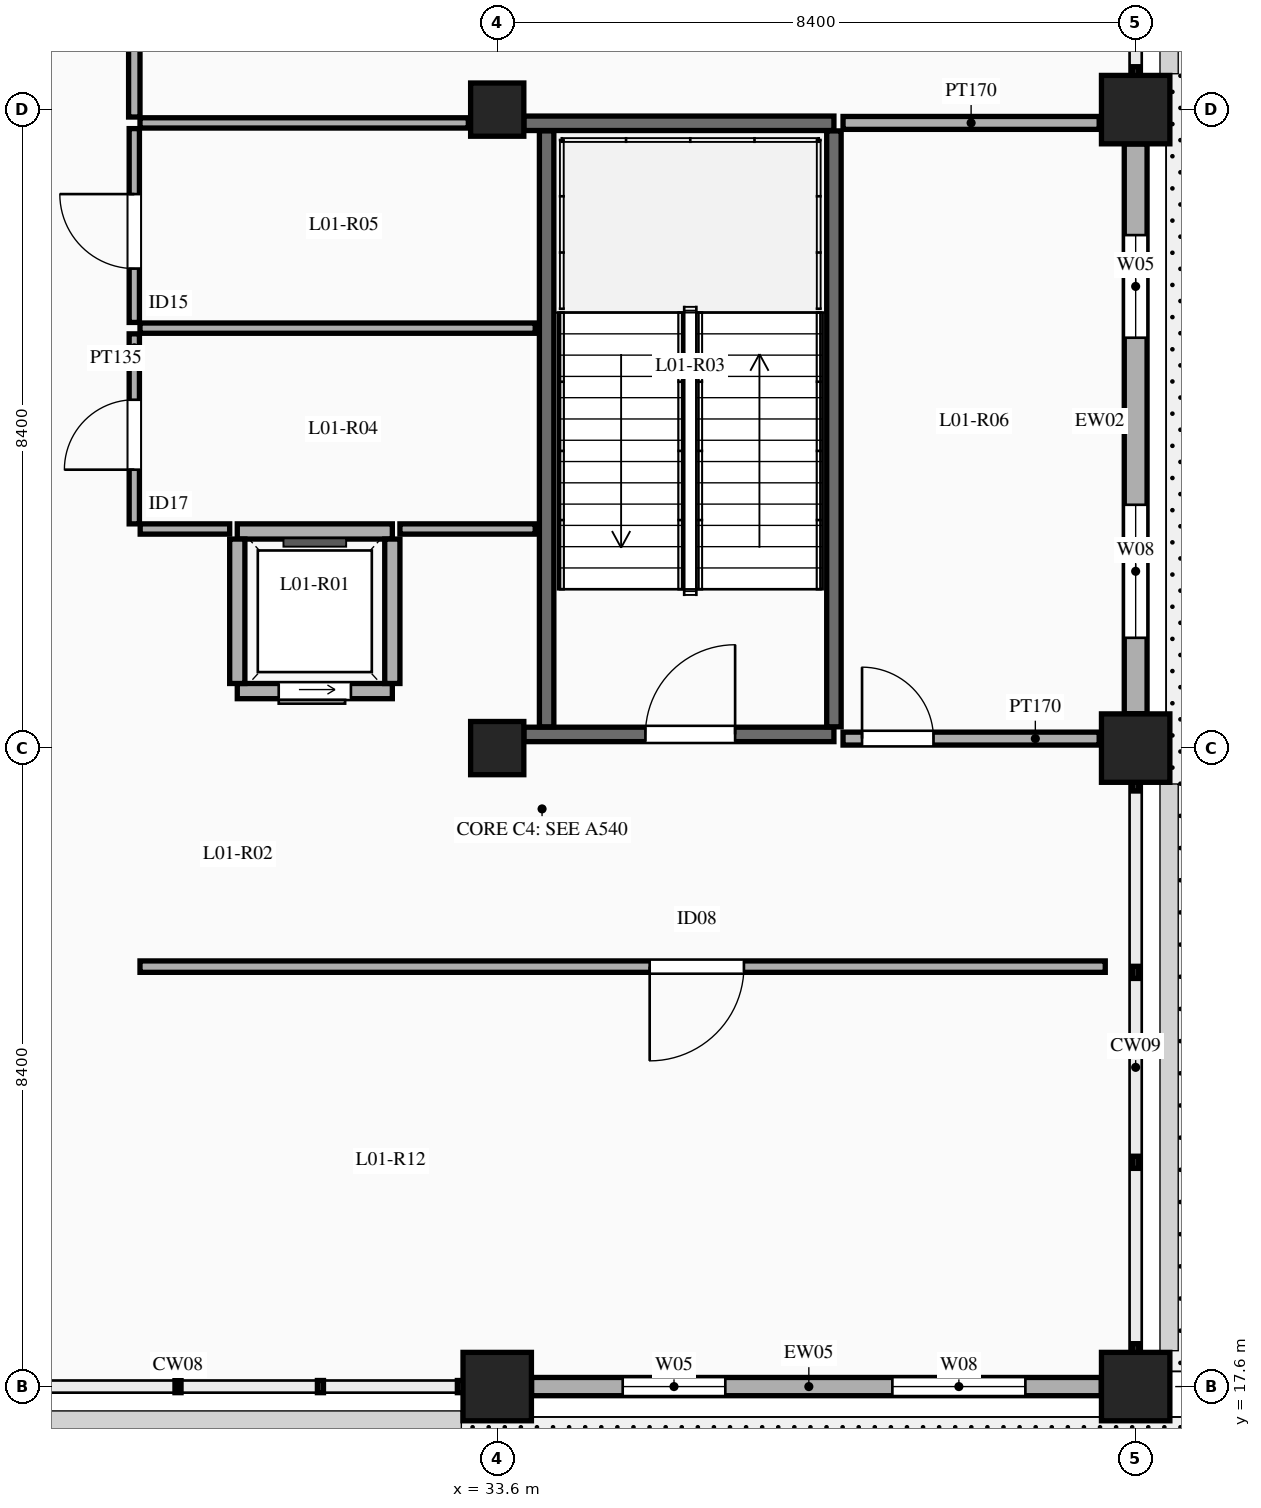
"""IFC4 building model, lengths in metres.
Left out: names, types, materials, properties, quantities, classifications, styles, units other than length and angle.
Written with IfcOpenShell. Run it as: python <this file> out.ifc"""

import sys

from ifc_helpers import new_model, si_unit, direction, frame, frame_2d, origin, origin_2d, place, context, subcontext, project, spatial, rectangle, circle, extrude, element, fill, save


model = new_model("IFC4")
c1 = context("Model", 3, precision=1e-05, world=origin(), true_north=direction((0.0, 1.0)))
c2 = subcontext(c1, "Body", "Model", "MODEL_VIEW")
j1 = project(units=[si_unit("LENGTHUNIT", "METRE"), si_unit("PLANEANGLEUNIT", "RADIAN")], contexts=[c1])
p1 = place(None, origin())
s1 = spatial("IfcSite", under=j1, at=p1, CompositionType="ELEMENT")
p2 = place(p1, origin())
s2 = spatial("IfcBuilding", under=s1, at=p2, CompositionType="ELEMENT")
p3 = place(p2, frame((0.0, 0.0, 5.4)))
s3 = spatial("IfcBuildingStorey", under=s2, at=p3, CompositionType="ELEMENT", Elevation=5.4)
p4 = place(p3, frame((33.6, 17.6, 0.0), z_axis=(0.0, 0.0, 1.0), x_axis=(1.0, 0.0, 0.0)))
e1 = element("IfcColumn", 1, at=p4, inside=s3, PredefinedType="COLUMN", context=c2, shape_type="SweptSolid", body=[
    extrude(circle(Radius=0.45, at=origin_2d()), origin(), (0.0, 0.0, 1.0), 4.8),
])
for number, where, z_axis, x_axis in (
    (2, (33.6, 26.0, 0.0), (0.0, 0.0, 1.0), (1.0, 0.0, 0.0)),
    (3, (33.6, 34.4, 0.0), (0.0, 0.0, 1.0), (1.0, 0.0, 0.0)),
):
    element("IfcColumn", number, at=place(p3, frame(where, z_axis=z_axis, x_axis=x_axis)), inside=s3, PredefinedType="COLUMN", context=c2, shape_type="SweptSolid", body=[
        extrude(rectangle(XDim=0.7, YDim=0.7, at=origin_2d()), origin(), (0.0, 0.0, 1.0), 4.8),
    ])
for number, where, z_axis, x_axis in (
    (4, (42.0, 17.6, 0.0), (0.0, 0.0, 1.0), (1.0, 0.0, 0.0)),
    (5, (42.0, 26.0, 0.0), (0.0, 0.0, 1.0), (1.0, 0.0, 0.0)),
    (6, (42.0, 34.4, 0.0), (0.0, 0.0, 1.0), (1.0, 0.0, 0.0)),
):
    element("IfcColumn", number, at=place(p3, frame(where, z_axis=z_axis, x_axis=x_axis)), inside=s3, PredefinedType="COLUMN", context=c2, shape_type="SweptSolid", body=[
        extrude(circle(Radius=0.45, at=origin_2d()), origin(), (0.0, 0.0, 1.0), 4.8),
    ])
p5 = place(p3, frame((34.052, 17.6, 0.0), z_axis=(0.0, 0.0, 1.0), x_axis=(1.0, 0.0, 0.0)))
e7 = element("IfcWall", 7, at=p5, inside=s3, PredefinedType="SOLIDWALL", context=c2, shape_type="SweptSolid", body=[
    extrude(rectangle(XDim=7.496, YDim=0.24, at=frame_2d((3.748, 0.0))), origin(), (0.0, 0.0, 1.0), 3.85),
])
p6 = place(p5, frame((1.199, 0.0, 0.9)))
e8 = element("IfcOpeningElement", 8, at=p6, cuts=e7, PredefinedType="OPENING", context=c2, shape_type="SweptSolid", body=[
    extrude(rectangle(XDim=1.35, YDim=1.85, at=frame_2d((0.675, 0.925))), frame((0.0, 0.13, 0.0), z_axis=(0.0, -1.0, 0.0), x_axis=(1.0, 0.0, 0.0)), (0.0, 0.0, 1.0), 0.26),
])
p7 = place(p5, frame((4.747, 0.0, 0.9)))
e9 = element("IfcOpeningElement", 9, at=p7, cuts=e7, PredefinedType="OPENING", context=c2, shape_type="SweptSolid", body=[
    extrude(rectangle(XDim=1.75, YDim=2.2, at=frame_2d((0.875, 1.1))), frame((0.0, 0.13, 0.0), z_axis=(0.0, -1.0, 0.0), x_axis=(1.0, 0.0, 0.0)), (0.0, 0.0, 1.0), 0.26),
])
p8 = place(p3, frame((42.0, 26.452, 0.0), z_axis=(0.0, 0.0, 1.0), x_axis=(0.0, 1.0, 0.0)))
e10 = element("IfcWall", 10, at=p8, inside=s3, PredefinedType="SOLIDWALL", context=c2, shape_type="SweptSolid", body=[
    extrude(rectangle(XDim=7.496, YDim=0.3, at=frame_2d((3.748, 0.0))), origin(), (0.0, 0.0, 1.0), 3.85),
])
p9 = place(p8, frame((0.999, 0.0, 0.9)))
e11 = element("IfcOpeningElement", 11, at=p9, cuts=e10, PredefinedType="OPENING", context=c2, shape_type="SweptSolid", body=[
    extrude(rectangle(XDim=1.75, YDim=2.2, at=frame_2d((0.875, 1.1))), frame((0.0, 0.16, 0.0), z_axis=(0.0, -1.0, 0.0), x_axis=(1.0, 0.0, 0.0)), (0.0, 0.0, 1.0), 0.32),
])
p10 = place(p8, frame((4.947, 0.0, 0.9)))
e12 = element("IfcOpeningElement", 12, at=p10, cuts=e10, PredefinedType="OPENING", context=c2, shape_type="SweptSolid", body=[
    extrude(rectangle(XDim=1.35, YDim=1.85, at=frame_2d((0.675, 0.925))), frame((0.0, 0.16, 0.0), z_axis=(0.0, -1.0, 0.0), x_axis=(1.0, 0.0, 0.0)), (0.0, 0.0, 1.0), 0.32),
])
p11 = place(p3, frame((30.18, 26.75, 0.0), z_axis=(0.0, 0.0, 1.0), x_axis=(1.0, 0.0, 0.0)))
e13 = element("IfcWall", 13, at=p11, inside=s3, PredefinedType="SOLIDWALL", context=c2, shape_type="SweptSolid", body=[
    extrude(rectangle(XDim=2.04, YDim=0.2, at=frame_2d((1.02, 0.0))), origin(), (0.0, 0.0, 1.0), 4.58),
])
p12 = place(p11, frame((0.545, 0.0, 0.0)))
e14 = element("IfcOpeningElement", 14, at=p12, cuts=e13, PredefinedType="OPENING", context=c2, shape_type="SweptSolid", body=[
    extrude(rectangle(XDim=0.95, YDim=2.15, at=frame_2d((0.475, 1.075))), frame((0.0, 0.11, 0.0), z_axis=(0.0, -1.0, 0.0), x_axis=(1.0, 0.0, 0.0)), (0.0, 0.0, 1.0), 0.22),
])
p13 = place(p3, frame((30.18, 28.85, 0.0), z_axis=(0.0, 0.0, 1.0), x_axis=(1.0, 0.0, 0.0)))
e15 = element("IfcWall", 15, at=p13, inside=s3, PredefinedType="SOLIDWALL", context=c2, shape_type="SweptSolid", body=[
    extrude(rectangle(XDim=2.04, YDim=0.2, at=frame_2d((1.02, 0.0))), origin(), (0.0, 0.0, 1.0), 4.58),
])
for number, where, z_axis, x_axis in (
    (16, (30.18, 26.85, 0.0), (0.0, 0.0, 1.0), (0.0, 1.0, 0.0)),
    (17, (32.22, 26.85, 0.0), (0.0, 0.0, 1.0), (0.0, 1.0, 0.0)),
):
    element("IfcWall", number, at=place(p3, frame(where, z_axis=z_axis, x_axis=x_axis)), inside=s3, PredefinedType="SOLIDWALL", context=c2, shape_type="SweptSolid", body=[
        extrude(rectangle(XDim=1.9, YDim=0.2, at=frame_2d((0.95, 0.0))), origin(), (0.0, 0.0, 1.0), 4.58),
    ])
p14 = place(p3, frame((33.95, 26.18, 0.0), z_axis=(0.0, 0.0, 1.0), x_axis=(1.0, 0.0, 0.0)))
e18 = element("IfcWall", 18, at=p14, inside=s3, PredefinedType="SOLIDWALL", context=c2, shape_type="SweptSolid", body=[
    extrude(rectangle(XDim=4.08, YDim=0.19, at=frame_2d((2.04, 0.0))), origin(), (0.0, 0.0, 1.0), 4.58),
])
p15 = place(p14, frame((1.6, 0.0, 0.0)))
e19 = element("IfcOpeningElement", 19, at=p15, cuts=e18, PredefinedType="OPENING", context=c2, shape_type="SweptSolid", body=[
    extrude(rectangle(XDim=1.18, YDim=2.15, at=frame_2d((0.59, 1.075))), frame((0.0, 0.105, 0.0), z_axis=(0.0, -1.0, 0.0), x_axis=(1.0, 0.0, 0.0)), (0.0, 0.0, 1.0), 0.21),
])
p16 = place(p3, frame((33.95, 34.22, 0.0), z_axis=(0.0, 0.0, 1.0), x_axis=(1.0, 0.0, 0.0)))
e20 = element("IfcWall", 20, at=p16, inside=s3, PredefinedType="SOLIDWALL", context=c2, shape_type="SweptSolid", body=[
    extrude(rectangle(XDim=4.08, YDim=0.19, at=frame_2d((2.04, 0.0))), origin(), (0.0, 0.0, 1.0), 4.58),
])
for number, where, z_axis, x_axis in (
    (21, (34.25, 26.28, 0.0), (0.0, 0.0, 1.0), (0.0, 1.0, 0.0)),
    (22, (38.03, 26.28, 0.0), (0.0, 0.0, 1.0), (0.0, 1.0, 0.0)),
):
    element("IfcWall", number, at=place(p3, frame(where, z_axis=z_axis, x_axis=x_axis)), inside=s3, PredefinedType="SOLIDWALL", context=c2, shape_type="SweptSolid", body=[
        extrude(rectangle(XDim=7.84, YDim=0.19, at=frame_2d((3.92, 0.0))), origin(), (0.0, 0.0, 1.0), 4.58),
    ])
p17 = place(p3, frame((38.15, 26.125, 0.0), z_axis=(0.0, 0.0, 1.0), x_axis=(1.0, 0.0, 0.0)))
e23 = element("IfcWall", 23, at=p17, inside=s3, PredefinedType="PARTITIONING", context=c2, shape_type="SweptSolid", body=[
    extrude(rectangle(XDim=3.37, YDim=0.17, at=frame_2d((1.685, 0.0))), origin(), (0.0, 0.0, 1.0), 2.95),
])
p18 = place(p17, frame((0.25, 0.0, 0.0)))
e24 = element("IfcOpeningElement", 24, at=p18, cuts=e23, PredefinedType="OPENING", context=c2, shape_type="SweptSolid", body=[
    extrude(rectangle(XDim=0.94, YDim=2.1, at=frame_2d((0.47, 1.05))), frame((0.0, 0.095, 0.0), z_axis=(0.0, -1.0, 0.0), x_axis=(1.0, 0.0, 0.0)), (0.0, 0.0, 1.0), 0.19),
])
p19 = place(p3, frame((28.9, 23.125, 0.0), z_axis=(0.0, 0.0, 1.0), x_axis=(1.0, 0.0, 0.0)))
e25 = element("IfcWall", 25, at=p19, inside=s3, PredefinedType="PARTITIONING", context=c2, shape_type="SweptSolid", body=[
    extrude(rectangle(XDim=12.7, YDim=0.15, at=frame_2d((6.35, 0.0))), origin(), (0.0, 0.0, 1.0), 2.95),
])
p20 = place(p19, frame((6.706, 0.0, 0.0)))
e26 = element("IfcOpeningElement", 26, at=p20, cuts=e25, PredefinedType="OPENING", context=c2, shape_type="SweptSolid", body=[
    extrude(rectangle(XDim=1.24, YDim=2.2, at=frame_2d((0.62, 1.1))), frame((0.0, 0.085, 0.0), z_axis=(0.0, -1.0, 0.0), x_axis=(1.0, 0.0, 0.0)), (0.0, 0.0, 1.0), 0.17),
])
p21 = place(p3, frame((28.9, 31.525, 0.0), z_axis=(0.0, 0.0, 1.0), x_axis=(1.0, 0.0, 0.0)))
e27 = element("IfcWall", 27, at=p21, inside=s3, PredefinedType="PARTITIONING", context=c2, shape_type="SweptSolid", body=[
    extrude(rectangle(XDim=5.2, YDim=0.135, at=frame_2d((2.6, 0.0))), origin(), (0.0, 0.0, 1.0), 2.95),
])
p22 = place(p3, frame((28.825, 28.95, 0.0), z_axis=(0.0, 0.0, 1.0), x_axis=(0.0, 1.0, 0.0)))
e28 = element("IfcWall", 28, at=p22, inside=s3, PredefinedType="PARTITIONING", context=c2, shape_type="SweptSolid", body=[
    extrude(rectangle(XDim=2.5, YDim=0.135, at=frame_2d((1.25, 0.0))), origin(), (0.0, 0.0, 1.0), 2.95),
])
p23 = place(p22, frame((0.713, 0.0, 0.0)))
e29 = element("IfcOpeningElement", 29, at=p23, cuts=e28, PredefinedType="OPENING", context=c2, shape_type="SweptSolid", body=[
    extrude(rectangle(XDim=0.92, YDim=2.12, at=frame_2d((0.46, 1.06))), frame((0.0, 0.077, 0.0), z_axis=(0.0, -1.0, 0.0), x_axis=(1.0, 0.0, 0.0)), (0.0, 0.0, 1.0), 0.155),
])
p24 = place(p3, frame((28.825, 31.6, 0.0), z_axis=(0.0, 0.0, 1.0), x_axis=(0.0, 1.0, 0.0)))
e30 = element("IfcWall", 30, at=p24, inside=s3, PredefinedType="PARTITIONING", context=c2, shape_type="SweptSolid", body=[
    extrude(rectangle(XDim=2.55, YDim=0.135, at=frame_2d((1.275, 0.0))), origin(), (0.0, 0.0, 1.0), 2.95),
])
p25 = place(p24, frame((0.708, 0.0, 0.0)))
e31 = element("IfcOpeningElement", 31, at=p25, cuts=e30, PredefinedType="OPENING", context=c2, shape_type="SweptSolid", body=[
    extrude(rectangle(XDim=0.98, YDim=2.15, at=frame_2d((0.49, 1.075))), frame((0.0, 0.077, 0.0), z_axis=(0.0, -1.0, 0.0), x_axis=(1.0, 0.0, 0.0)), (0.0, 0.0, 1.0), 0.155),
])
p26 = place(p3, frame((28.9, 34.225, 0.0), z_axis=(0.0, 0.0, 1.0), x_axis=(1.0, 0.0, 0.0)))
e32 = element("IfcWall", 32, at=p26, inside=s3, PredefinedType="PARTITIONING", context=c2, shape_type="SweptSolid", body=[
    extrude(rectangle(XDim=4.32, YDim=0.135, at=frame_2d((2.16, 0.0))), origin(), (0.0, 0.0, 1.0), 2.95),
])
p27 = place(p3, frame((38.15, 34.225, 0.0), z_axis=(0.0, 0.0, 1.0), x_axis=(1.0, 0.0, 0.0)))
e33 = element("IfcWall", 33, at=p27, inside=s3, PredefinedType="PARTITIONING", context=c2, shape_type="SweptSolid", body=[
    extrude(rectangle(XDim=3.37, YDim=0.17, at=frame_2d((1.685, 0.0))), origin(), (0.0, 0.0, 1.0), 2.95),
])
p28 = place(p3, frame((28.825, 34.302, 0.0), z_axis=(0.0, 0.0, 1.0), x_axis=(0.0, 1.0, 0.0)))
e34 = element("IfcWall", 34, at=p28, inside=s3, PredefinedType="PARTITIONING", context=c2, shape_type="SweptSolid", body=[
    extrude(rectangle(XDim=14.698, YDim=0.15, at=frame_2d((7.349, 0.0))), origin(), (0.0, 0.0, 1.0), 2.95),
])
p29 = place(p28, frame((6.729, 0.0, 0.0)))
e35 = element("IfcOpeningElement", 35, at=p29, cuts=e34, PredefinedType="OPENING", context=c2, shape_type="SweptSolid", body=[
    extrude(rectangle(XDim=1.24, YDim=2.2, at=frame_2d((0.62, 1.1))), frame((0.0, 0.085, 0.0), z_axis=(0.0, -1.0, 0.0), x_axis=(1.0, 0.0, 0.0)), (0.0, 0.0, 1.0), 0.17),
])
p30 = place(p3, frame((28.903, 28.883, 0.0), z_axis=(0.0, 0.0, 1.0), x_axis=(1.0, 0.0, 0.0)))
e36 = element("IfcWall", 36, at=p30, inside=s3, PredefinedType="PARTITIONING", context=c2, shape_type="SweptSolid", body=[
    extrude(rectangle(XDim=1.177, YDim=0.135, at=frame_2d((0.589, 0.0))), origin(), (0.0, 0.0, 1.0), 2.95),
])
p31 = place(p3, frame((32.32, 28.883, 0.0), z_axis=(0.0, 0.0, 1.0), x_axis=(1.0, 0.0, 0.0)))
e37 = element("IfcWall", 37, at=p31, inside=s3, PredefinedType="PARTITIONING", context=c2, shape_type="SweptSolid", body=[
    extrude(rectangle(XDim=1.78, YDim=0.135, at=frame_2d((0.89, 0.0))), origin(), (0.0, 0.0, 1.0), 2.95),
])
p32 = place(p6, origin())
e38 = element("IfcWindow", 38, at=p32, inside=s3, PartitioningType="DOUBLE_PANEL_VERTICAL", PredefinedType="WINDOW", context=c2, shape_type="SweptSolid", body=[
    extrude(rectangle(XDim=1.35, YDim=1.85, at=frame_2d((0.675, 0.925))), frame((0.0, 0.03, 0.0), z_axis=(0.0, -1.0, 0.0), x_axis=(1.0, 0.0, 0.0)), (0.0, 0.0, 1.0), 0.06),
])
fill(e8, e38)
p33 = place(p7, origin())
e39 = element("IfcWindow", 39, at=p33, inside=s3, PartitioningType="DOUBLE_PANEL_VERTICAL", PredefinedType="WINDOW", context=c2, shape_type="SweptSolid", body=[
    extrude(rectangle(XDim=1.75, YDim=2.2, at=frame_2d((0.875, 1.1))), frame((0.0, 0.03, 0.0), z_axis=(0.0, -1.0, 0.0), x_axis=(1.0, 0.0, 0.0)), (0.0, 0.0, 1.0), 0.06),
])
fill(e9, e39)
p34 = place(p9, origin())
e40 = element("IfcWindow", 40, at=p34, inside=s3, PartitioningType="DOUBLE_PANEL_VERTICAL", PredefinedType="WINDOW", context=c2, shape_type="SweptSolid", body=[
    extrude(rectangle(XDim=1.75, YDim=2.2, at=frame_2d((0.875, 1.1))), frame((0.0, 0.03, 0.0), z_axis=(0.0, -1.0, 0.0), x_axis=(1.0, 0.0, 0.0)), (0.0, 0.0, 1.0), 0.06),
])
fill(e11, e40)
p35 = place(p10, origin())
e41 = element("IfcWindow", 41, at=p35, inside=s3, PartitioningType="DOUBLE_PANEL_VERTICAL", PredefinedType="WINDOW", context=c2, shape_type="SweptSolid", body=[
    extrude(rectangle(XDim=1.35, YDim=1.85, at=frame_2d((0.675, 0.925))), frame((0.0, 0.03, 0.0), z_axis=(0.0, -1.0, 0.0), x_axis=(1.0, 0.0, 0.0)), (0.0, 0.0, 1.0), 0.06),
])
fill(e12, e41)
p36 = place(p12, frame((0.95, 0.0, 0.0), z_axis=(0.0, 0.0, 1.0), x_axis=(-1.0, 0.0, 0.0)))
e42 = element("IfcDoor", 42, at=p36, inside=s3, OperationType="SLIDING_TO_LEFT", PredefinedType="DOOR", context=c2, shape_type="SweptSolid", body=[
    extrude(rectangle(XDim=0.95, YDim=2.15, at=frame_2d((0.475, 1.075))), frame((0.0, 0.025, 0.0), z_axis=(0.0, -1.0, 0.0), x_axis=(1.0, 0.0, 0.0)), (0.0, 0.0, 1.0), 0.05),
])
fill(e14, e42)
p37 = place(p15, origin())
e43 = element("IfcDoor", 43, at=p37, inside=s3, OperationType="SINGLE_SWING_RIGHT", PredefinedType="DOOR", context=c2, shape_type="SweptSolid", body=[
    extrude(rectangle(XDim=1.18, YDim=2.15, at=frame_2d((0.59, 1.075))), frame((0.0, 0.025, 0.0), z_axis=(0.0, -1.0, 0.0), x_axis=(1.0, 0.0, 0.0)), (0.0, 0.0, 1.0), 0.05),
])
fill(e19, e43)
p38 = place(p23, origin())
e44 = element("IfcDoor", 44, at=p38, inside=s3, OperationType="SINGLE_SWING_LEFT", PredefinedType="DOOR", context=c2, shape_type="SweptSolid", body=[
    extrude(rectangle(XDim=0.92, YDim=2.12, at=frame_2d((0.46, 1.06))), frame((0.0, 0.025, 0.0), z_axis=(0.0, -1.0, 0.0), x_axis=(1.0, 0.0, 0.0)), (0.0, 0.0, 1.0), 0.05),
])
fill(e29, e44)
p39 = place(p25, origin())
e45 = element("IfcDoor", 45, at=p39, inside=s3, OperationType="SINGLE_SWING_RIGHT", PredefinedType="DOOR", context=c2, shape_type="SweptSolid", body=[
    extrude(rectangle(XDim=0.98, YDim=2.15, at=frame_2d((0.49, 1.075))), frame((0.0, 0.025, 0.0), z_axis=(0.0, -1.0, 0.0), x_axis=(1.0, 0.0, 0.0)), (0.0, 0.0, 1.0), 0.05),
])
fill(e31, e45)
p40 = place(p18, origin())
e46 = element("IfcDoor", 46, at=p40, inside=s3, OperationType="SINGLE_SWING_LEFT", PredefinedType="DOOR", context=c2, shape_type="SweptSolid", body=[
    extrude(rectangle(XDim=0.94, YDim=2.1, at=frame_2d((0.47, 1.05))), frame((0.0, 0.025, 0.0), z_axis=(0.0, -1.0, 0.0), x_axis=(1.0, 0.0, 0.0)), (0.0, 0.0, 1.0), 0.05),
])
fill(e24, e46)
p41 = place(p20, frame((1.24, 0.0, 0.0), z_axis=(0.0, 0.0, 1.0), x_axis=(-1.0, 0.0, 0.0)))
e47 = element("IfcDoor", 47, at=p41, inside=s3, OperationType="SINGLE_SWING_RIGHT", PredefinedType="DOOR", context=c2, shape_type="SweptSolid", body=[
    extrude(rectangle(XDim=1.24, YDim=2.2, at=frame_2d((0.62, 1.1))), frame((0.0, 0.025, 0.0), z_axis=(0.0, -1.0, 0.0), x_axis=(1.0, 0.0, 0.0)), (0.0, 0.0, 1.0), 0.05),
])
fill(e26, e47)
save(model, sys.argv[1])
